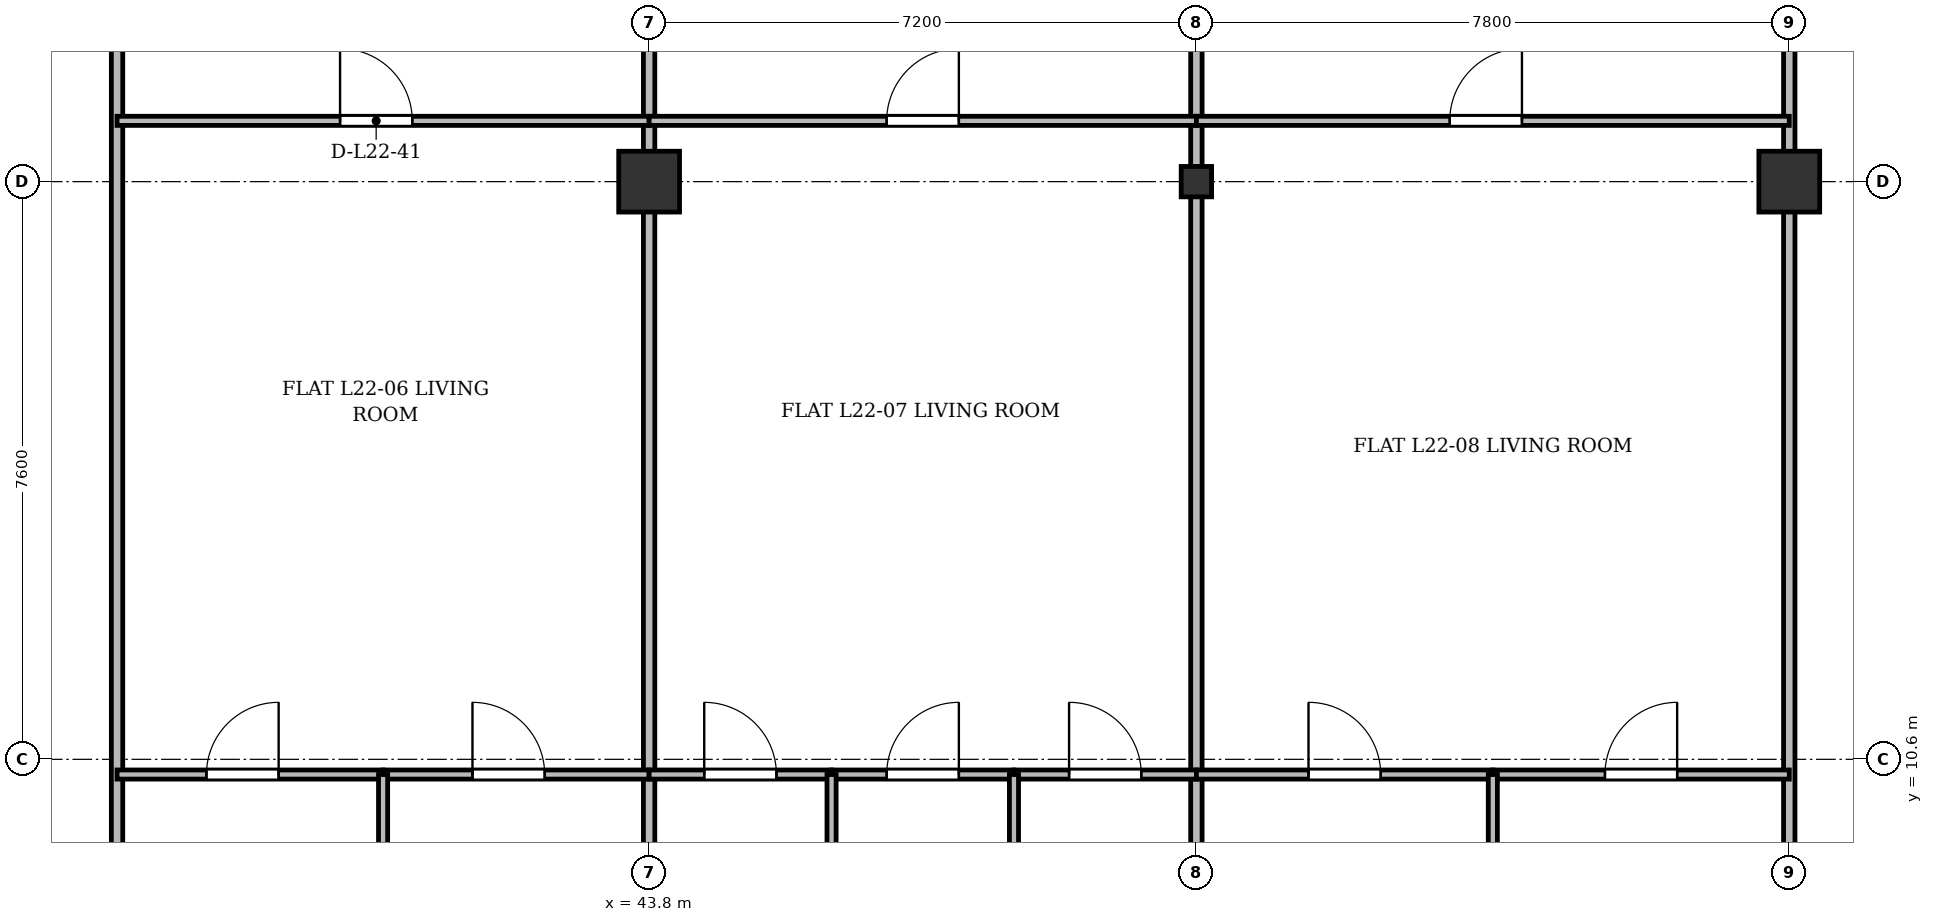
"""IFC4 building model, lengths in metres.
Left out: names, types, materials, properties, quantities, classifications, styles, units other than length and angle.
Written with IfcOpenShell. Run it as: python <this file> out.ifc"""

import sys

from ifc_helpers import new_model, si_unit, direction, frame, frame_2d, origin, origin_2d, place, context, subcontext, project, spatial, rectangle, i_section, extrude, source, transform, mapped, element, fill, save


model = new_model("IFC4")
c1 = context("Model", 3, precision=1e-05, world=origin(), true_north=direction((0.0, 1.0)))
c2 = subcontext(c1, "Body", "Model", "MODEL_VIEW")
j1 = project(units=[si_unit("LENGTHUNIT", "METRE"), si_unit("PLANEANGLEUNIT", "RADIAN")], contexts=[c1])
p1 = place(None, origin())
s1 = spatial("IfcSite", under=j1, at=p1, CompositionType="ELEMENT")
p2 = place(p1, origin())
s2 = spatial("IfcBuilding", under=s1, at=p2, CompositionType="ELEMENT")
p3 = place(p2, frame((0.0, 0.0, 88.9)))
s3 = spatial("IfcBuildingStorey", under=s2, at=p3, CompositionType="ELEMENT", Elevation=88.9)
m1 = source(origin(), c2, "Body", "SweptSolid", [
    extrude(rectangle(XDim=0.8, YDim=0.8, at=origin_2d()), origin(), (0.0, 0.0, 1.0), 3.6),
])
p4 = place(p3, frame((43.8, 18.2, 0.0), z_axis=(0.0, 0.0, 1.0), x_axis=(1.0, 0.0, 0.0)))
e1 = element("IfcColumn", 1, at=p4, inside=s3, PredefinedType="COLUMN", context=c2, shape_type="MappedRepresentation", body=[
    mapped(m1, transform((0.0, 0.0, 0.0), x_axis=(1.0, 0.0, 0.0), y_axis=(0.0, 1.0, 0.0), z_axis=(0.0, 0.0, 1.0), scale=1.0)),
])
m2 = source(origin(), c2, "Body", "SweptSolid", [
    extrude(i_section(OverallWidth=0.4, OverallDepth=0.4, WebThickness=0.022, FlangeThickness=0.035, at=origin_2d()), origin(), (0.0, 0.0, 1.0), 3.6),
])
p5 = place(p3, frame((51.0, 18.2, 0.0), z_axis=(0.0, 0.0, 1.0), x_axis=(1.0, 0.0, 0.0)))
e2 = element("IfcColumn", 2, at=p5, inside=s3, PredefinedType="COLUMN", context=c2, shape_type="MappedRepresentation", body=[
    mapped(m2, transform((0.0, 0.0, 0.0), x_axis=(1.0, 0.0, 0.0), y_axis=(0.0, 1.0, 0.0), z_axis=(0.0, 0.0, 1.0), scale=1.0)),
])
p6 = place(p3, frame((58.8, 18.2, 0.0), z_axis=(0.0, 0.0, 1.0), x_axis=(1.0, 0.0, 0.0)))
e3 = element("IfcColumn", 3, at=p6, inside=s3, PredefinedType="COLUMN", context=c2, shape_type="MappedRepresentation", body=[
    mapped(m1, transform((0.0, 0.0, 0.0), x_axis=(1.0, 0.0, 0.0), y_axis=(0.0, 1.0, 0.0), z_axis=(0.0, 0.0, 1.0), scale=1.0)),
])
p7 = place(p3, frame((36.8, 3.145, 0.0), z_axis=(0.0, 0.0, 1.0), x_axis=(0.0, 1.0, 0.0)))
e4 = element("IfcWall", 4, at=p7, inside=s3, PredefinedType="PARTITIONING", context=c2, shape_type="SweptSolid", body=[
    extrude(rectangle(XDim=24.455, YDim=0.15, at=frame_2d((12.228, 0.0))), origin(), (0.0, 0.0, 1.0), 2.752),
])
for number, where, z_axis, x_axis in (
    (5, (43.8, 3.145, 0.0), (0.0, 0.0, 1.0), (0.0, 1.0, 0.0)),
    (6, (51.0, 3.145, 0.0), (0.0, 0.0, 1.0), (0.0, 1.0, 0.0)),
    (7, (58.8, 3.145, 0.0), (0.0, 0.0, 1.0), (0.0, 1.0, 0.0)),
):
    element("IfcWall", number, at=place(p3, frame(where, z_axis=z_axis, x_axis=x_axis)), inside=s3, PredefinedType="PARTITIONING", context=c2, shape_type="SweptSolid", body=[
        extrude(rectangle(XDim=24.455, YDim=0.15, at=frame_2d((12.228, 0.0))), origin(), (0.0, 0.0, 1.0), 2.84),
    ])
p8 = place(p3, frame((36.8, 19.0, 0.0), z_axis=(0.0, 0.0, 1.0), x_axis=(1.0, 0.0, 0.0)))
e8 = element("IfcWall", 8, at=p8, inside=s3, PredefinedType="PARTITIONING", context=c2, shape_type="SweptSolid", body=[
    extrude(rectangle(XDim=7.0, YDim=0.12, at=frame_2d((3.5, 0.0))), origin(), (0.0, 0.0, 1.0), 2.84),
])
p9 = place(p8, frame((2.934, 0.0, 0.0)))
e9 = element("IfcOpeningElement", 9, at=p9, cuts=e8, PredefinedType="OPENING", context=c2, shape_type="SweptSolid", body=[
    extrude(rectangle(XDim=0.95, YDim=2.15, at=frame_2d((0.475, 1.075))), frame((0.0, 0.07, 0.0), z_axis=(0.0, -1.0, 0.0), x_axis=(1.0, 0.0, 0.0)), (0.0, 0.0, 1.0), 0.14),
])
p10 = place(p3, frame((36.8, 10.4, 0.0), z_axis=(0.0, 0.0, 1.0), x_axis=(1.0, 0.0, 0.0)))
e10 = element("IfcWall", 10, at=p10, inside=s3, PredefinedType="PARTITIONING", context=c2, shape_type="SweptSolid", body=[
    extrude(rectangle(XDim=3.5, YDim=0.12, at=frame_2d((1.75, 0.0))), origin(), (0.0, 0.0, 1.0), 3.34),
])
p11 = place(p10, frame((1.176, 0.0, 0.0)))
e11 = element("IfcOpeningElement", 11, at=p11, cuts=e10, PredefinedType="OPENING", context=c2, shape_type="SweptSolid", body=[
    extrude(rectangle(XDim=0.95, YDim=2.15, at=frame_2d((0.475, 1.075))), frame((0.0, 0.07, 0.0), z_axis=(0.0, -1.0, 0.0), x_axis=(1.0, 0.0, 0.0)), (0.0, 0.0, 1.0), 0.14),
])
p12 = place(p3, frame((40.3, 10.4, 0.0), z_axis=(0.0, 0.0, 1.0), x_axis=(1.0, 0.0, 0.0)))
e12 = element("IfcWall", 12, at=p12, inside=s3, PredefinedType="PARTITIONING", context=c2, shape_type="SweptSolid", body=[
    extrude(rectangle(XDim=3.5, YDim=0.12, at=frame_2d((1.75, 0.0))), origin(), (0.0, 0.0, 1.0), 2.84),
])
p13 = place(p12, frame((1.176, 0.0, 0.0)))
e13 = element("IfcOpeningElement", 13, at=p13, cuts=e12, PredefinedType="OPENING", context=c2, shape_type="SweptSolid", body=[
    extrude(rectangle(XDim=0.95, YDim=2.15, at=frame_2d((0.475, 1.075))), frame((0.0, 0.07, 0.0), z_axis=(0.0, -1.0, 0.0), x_axis=(1.0, 0.0, 0.0)), (0.0, 0.0, 1.0), 0.14),
])
p14 = place(p3, frame((40.3, 3.145, 0.0), z_axis=(0.0, 0.0, 1.0), x_axis=(0.0, 1.0, 0.0)))
e14 = element("IfcWall", 14, at=p14, inside=s3, PredefinedType="PARTITIONING", context=c2, shape_type="SweptSolid", body=[
    extrude(rectangle(XDim=7.255, YDim=0.12, at=frame_2d((3.627, 0.0))), origin(), (0.0, 0.0, 1.0), 2.752),
])
p15 = place(p3, frame((43.8, 19.0, 0.0), z_axis=(0.0, 0.0, 1.0), x_axis=(1.0, 0.0, 0.0)))
e15 = element("IfcWall", 15, at=p15, inside=s3, PredefinedType="PARTITIONING", context=c2, shape_type="SweptSolid", body=[
    extrude(rectangle(XDim=7.2, YDim=0.12, at=frame_2d((3.6, 0.0))), origin(), (0.0, 0.0, 1.0), 2.84),
])
p16 = place(p15, frame((3.125, 0.0, 0.0)))
e16 = element("IfcOpeningElement", 16, at=p16, cuts=e15, PredefinedType="OPENING", context=c2, shape_type="SweptSolid", body=[
    extrude(rectangle(XDim=0.95, YDim=2.15, at=frame_2d((0.475, 1.075))), frame((0.0, 0.07, 0.0), z_axis=(0.0, -1.0, 0.0), x_axis=(1.0, 0.0, 0.0)), (0.0, 0.0, 1.0), 0.14),
])
p17 = place(p3, frame((43.8, 10.4, 0.0), z_axis=(0.0, 0.0, 1.0), x_axis=(1.0, 0.0, 0.0)))
e17 = element("IfcWall", 17, at=p17, inside=s3, PredefinedType="PARTITIONING", context=c2, shape_type="SweptSolid", body=[
    extrude(rectangle(XDim=2.4, YDim=0.12, at=frame_2d((1.2, 0.0))), origin(), (0.0, 0.0, 1.0), 2.84),
])
p18 = place(p17, frame((0.725, 0.0, 0.0)))
e18 = element("IfcOpeningElement", 18, at=p18, cuts=e17, PredefinedType="OPENING", context=c2, shape_type="SweptSolid", body=[
    extrude(rectangle(XDim=0.95, YDim=2.15, at=frame_2d((0.475, 1.075))), frame((0.0, 0.07, 0.0), z_axis=(0.0, -1.0, 0.0), x_axis=(1.0, 0.0, 0.0)), (0.0, 0.0, 1.0), 0.14),
])
p19 = place(p3, frame((46.2, 10.4, 0.0), z_axis=(0.0, 0.0, 1.0), x_axis=(1.0, 0.0, 0.0)))
e19 = element("IfcWall", 19, at=p19, inside=s3, PredefinedType="PARTITIONING", context=c2, shape_type="SweptSolid", body=[
    extrude(rectangle(XDim=2.4, YDim=0.12, at=frame_2d((1.2, 0.0))), origin(), (0.0, 0.0, 1.0), 3.34),
])
p20 = place(p19, frame((0.725, 0.0, 0.0)))
e20 = element("IfcOpeningElement", 20, at=p20, cuts=e19, PredefinedType="OPENING", context=c2, shape_type="SweptSolid", body=[
    extrude(rectangle(XDim=0.95, YDim=2.15, at=frame_2d((0.475, 1.075))), frame((0.0, 0.07, 0.0), z_axis=(0.0, -1.0, 0.0), x_axis=(1.0, 0.0, 0.0)), (0.0, 0.0, 1.0), 0.14),
])
p21 = place(p3, frame((46.2, 3.145, 0.0), z_axis=(0.0, 0.0, 1.0), x_axis=(0.0, 1.0, 0.0)))
e21 = element("IfcWall", 21, at=p21, inside=s3, PredefinedType="PARTITIONING", context=c2, shape_type="SweptSolid", body=[
    extrude(rectangle(XDim=7.255, YDim=0.12, at=frame_2d((3.627, 0.0))), origin(), (0.0, 0.0, 1.0), 2.752),
])
p22 = place(p3, frame((48.6, 10.4, 0.0), z_axis=(0.0, 0.0, 1.0), x_axis=(1.0, 0.0, 0.0)))
e22 = element("IfcWall", 22, at=p22, inside=s3, PredefinedType="PARTITIONING", context=c2, shape_type="SweptSolid", body=[
    extrude(rectangle(XDim=2.4, YDim=0.12, at=frame_2d((1.2, 0.0))), origin(), (0.0, 0.0, 1.0), 2.84),
])
p23 = place(p22, frame((0.725, 0.0, 0.0)))
e23 = element("IfcOpeningElement", 23, at=p23, cuts=e22, PredefinedType="OPENING", context=c2, shape_type="SweptSolid", body=[
    extrude(rectangle(XDim=0.95, YDim=2.15, at=frame_2d((0.475, 1.075))), frame((0.0, 0.07, 0.0), z_axis=(0.0, -1.0, 0.0), x_axis=(1.0, 0.0, 0.0)), (0.0, 0.0, 1.0), 0.14),
])
p24 = place(p3, frame((48.6, 3.145, 0.0), z_axis=(0.0, 0.0, 1.0), x_axis=(0.0, 1.0, 0.0)))
e24 = element("IfcWall", 24, at=p24, inside=s3, PredefinedType="PARTITIONING", context=c2, shape_type="SweptSolid", body=[
    extrude(rectangle(XDim=7.255, YDim=0.12, at=frame_2d((3.627, 0.0))), origin(), (0.0, 0.0, 1.0), 2.752),
])
p25 = place(p3, frame((51.0, 19.0, 0.0), z_axis=(0.0, 0.0, 1.0), x_axis=(1.0, 0.0, 0.0)))
e25 = element("IfcWall", 25, at=p25, inside=s3, PredefinedType="PARTITIONING", context=c2, shape_type="SweptSolid", body=[
    extrude(rectangle(XDim=7.8, YDim=0.12, at=frame_2d((3.9, 0.0))), origin(), (0.0, 0.0, 1.0), 2.84),
])
p26 = place(p25, frame((3.333, 0.0, 0.0)))
e26 = element("IfcOpeningElement", 26, at=p26, cuts=e25, PredefinedType="OPENING", context=c2, shape_type="SweptSolid", body=[
    extrude(rectangle(XDim=0.95, YDim=2.15, at=frame_2d((0.475, 1.075))), frame((0.0, 0.07, 0.0), z_axis=(0.0, -1.0, 0.0), x_axis=(1.0, 0.0, 0.0)), (0.0, 0.0, 1.0), 0.14),
])
p27 = place(p3, frame((51.0, 10.4, 0.0), z_axis=(0.0, 0.0, 1.0), x_axis=(1.0, 0.0, 0.0)))
e27 = element("IfcWall", 27, at=p27, inside=s3, PredefinedType="PARTITIONING", context=c2, shape_type="SweptSolid", body=[
    extrude(rectangle(XDim=3.9, YDim=0.12, at=frame_2d((1.95, 0.0))), origin(), (0.0, 0.0, 1.0), 2.84),
])
p28 = place(p27, frame((1.475, 0.0, 0.0)))
e28 = element("IfcOpeningElement", 28, at=p28, cuts=e27, PredefinedType="OPENING", context=c2, shape_type="SweptSolid", body=[
    extrude(rectangle(XDim=0.95, YDim=2.15, at=frame_2d((0.475, 1.075))), frame((0.0, 0.07, 0.0), z_axis=(0.0, -1.0, 0.0), x_axis=(1.0, 0.0, 0.0)), (0.0, 0.0, 1.0), 0.14),
])
p29 = place(p3, frame((54.9, 10.4, 0.0), z_axis=(0.0, 0.0, 1.0), x_axis=(1.0, 0.0, 0.0)))
e29 = element("IfcWall", 29, at=p29, inside=s3, PredefinedType="PARTITIONING", context=c2, shape_type="SweptSolid", body=[
    extrude(rectangle(XDim=3.9, YDim=0.12, at=frame_2d((1.95, 0.0))), origin(), (0.0, 0.0, 1.0), 2.84),
])
p30 = place(p29, frame((1.475, 0.0, 0.0)))
e30 = element("IfcOpeningElement", 30, at=p30, cuts=e29, PredefinedType="OPENING", context=c2, shape_type="SweptSolid", body=[
    extrude(rectangle(XDim=0.95, YDim=2.15, at=frame_2d((0.475, 1.075))), frame((0.0, 0.07, 0.0), z_axis=(0.0, -1.0, 0.0), x_axis=(1.0, 0.0, 0.0)), (0.0, 0.0, 1.0), 0.14),
])
p31 = place(p3, frame((54.9, 3.145, 0.0), z_axis=(0.0, 0.0, 1.0), x_axis=(0.0, 1.0, 0.0)))
e31 = element("IfcWall", 31, at=p31, inside=s3, PredefinedType="PARTITIONING", context=c2, shape_type="SweptSolid", body=[
    extrude(rectangle(XDim=7.255, YDim=0.12, at=frame_2d((3.627, 0.0))), origin(), (0.0, 0.0, 1.0), 2.752),
])
m3 = source(origin(), c2, "Body", "SweptSolid", [
    extrude(rectangle(XDim=0.95, YDim=2.15, at=frame_2d((0.475, 1.075))), frame((0.0, 0.025, 0.0), z_axis=(0.0, -1.0, 0.0), x_axis=(1.0, 0.0, 0.0)), (0.0, 0.0, 1.0), 0.05),
])
p32 = place(p9, origin())
e32 = element("IfcDoor", 32, at=p32, inside=s3, OperationType="SINGLE_SWING_LEFT", PredefinedType="DOOR", context=c2, shape_type="MappedRepresentation", body=[
    mapped(m3, transform((0.0, 0.0, 0.0), x_axis=(1.0, 0.0, 0.0), y_axis=(0.0, 1.0, 0.0), z_axis=(0.0, 0.0, 1.0), scale=1.0)),
])
fill(e9, e32)
p33 = place(p11, origin())
e33 = element("IfcDoor", 33, at=p33, inside=s3, OperationType="SINGLE_SWING_RIGHT", PredefinedType="DOOR", context=c2, shape_type="MappedRepresentation", body=[
    mapped(m3, transform((0.0, 0.0, 0.0), x_axis=(1.0, 0.0, 0.0), y_axis=(0.0, 1.0, 0.0), z_axis=(0.0, 0.0, 1.0), scale=1.0)),
])
fill(e11, e33)
p34 = place(p13, origin())
e34 = element("IfcDoor", 34, at=p34, inside=s3, OperationType="SINGLE_SWING_LEFT", PredefinedType="DOOR", context=c2, shape_type="MappedRepresentation", body=[
    mapped(m3, transform((0.0, 0.0, 0.0), x_axis=(1.0, 0.0, 0.0), y_axis=(0.0, 1.0, 0.0), z_axis=(0.0, 0.0, 1.0), scale=1.0)),
])
fill(e13, e34)
p35 = place(p16, origin())
e35 = element("IfcDoor", 35, at=p35, inside=s3, OperationType="SINGLE_SWING_RIGHT", PredefinedType="DOOR", context=c2, shape_type="MappedRepresentation", body=[
    mapped(m3, transform((0.0, 0.0, 0.0), x_axis=(1.0, 0.0, 0.0), y_axis=(0.0, 1.0, 0.0), z_axis=(0.0, 0.0, 1.0), scale=1.0)),
])
fill(e16, e35)
p36 = place(p18, origin())
e36 = element("IfcDoor", 36, at=p36, inside=s3, OperationType="SINGLE_SWING_LEFT", PredefinedType="DOOR", context=c2, shape_type="MappedRepresentation", body=[
    mapped(m3, transform((0.0, 0.0, 0.0), x_axis=(1.0, 0.0, 0.0), y_axis=(0.0, 1.0, 0.0), z_axis=(0.0, 0.0, 1.0), scale=1.0)),
])
fill(e18, e36)
p37 = place(p20, origin())
e37 = element("IfcDoor", 37, at=p37, inside=s3, OperationType="SINGLE_SWING_RIGHT", PredefinedType="DOOR", context=c2, shape_type="MappedRepresentation", body=[
    mapped(m3, transform((0.0, 0.0, 0.0), x_axis=(1.0, 0.0, 0.0), y_axis=(0.0, 1.0, 0.0), z_axis=(0.0, 0.0, 1.0), scale=1.0)),
])
fill(e20, e37)
p38 = place(p23, origin())
e38 = element("IfcDoor", 38, at=p38, inside=s3, OperationType="SINGLE_SWING_LEFT", PredefinedType="DOOR", context=c2, shape_type="MappedRepresentation", body=[
    mapped(m3, transform((0.0, 0.0, 0.0), x_axis=(1.0, 0.0, 0.0), y_axis=(0.0, 1.0, 0.0), z_axis=(0.0, 0.0, 1.0), scale=1.0)),
])
fill(e23, e38)
p39 = place(p26, origin())
e39 = element("IfcDoor", 39, at=p39, inside=s3, OperationType="SINGLE_SWING_RIGHT", PredefinedType="DOOR", context=c2, shape_type="MappedRepresentation", body=[
    mapped(m3, transform((0.0, 0.0, 0.0), x_axis=(1.0, 0.0, 0.0), y_axis=(0.0, 1.0, 0.0), z_axis=(0.0, 0.0, 1.0), scale=1.0)),
])
fill(e26, e39)
p40 = place(p28, origin())
e40 = element("IfcDoor", 40, at=p40, inside=s3, OperationType="SINGLE_SWING_LEFT", PredefinedType="DOOR", context=c2, shape_type="MappedRepresentation", body=[
    mapped(m3, transform((0.0, 0.0, 0.0), x_axis=(1.0, 0.0, 0.0), y_axis=(0.0, 1.0, 0.0), z_axis=(0.0, 0.0, 1.0), scale=1.0)),
])
fill(e28, e40)
p41 = place(p30, origin())
e41 = element("IfcDoor", 41, at=p41, inside=s3, OperationType="SINGLE_SWING_RIGHT", PredefinedType="DOOR", context=c2, shape_type="MappedRepresentation", body=[
    mapped(m3, transform((0.0, 0.0, 0.0), x_axis=(1.0, 0.0, 0.0), y_axis=(0.0, 1.0, 0.0), z_axis=(0.0, 0.0, 1.0), scale=1.0)),
])
fill(e30, e41)
save(model, sys.argv[1])
